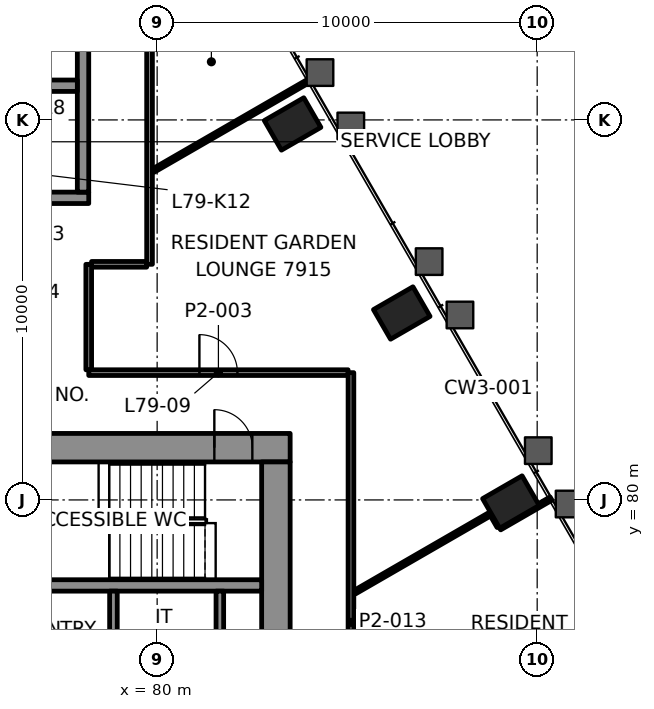
"""IFC4 building model, lengths in metres.
Left out: names, types, materials, properties, quantities, classifications, styles, units other than length and angle.
Written with IfcOpenShell. Run it as: python <this file> out.ifc"""

import sys

from ifc_helpers import new_model, si_unit, direction, frame, frame_2d, origin, origin_2d, place, context, subcontext, project, spatial, rectangle, hollow_rectangle, extrude, element, fill, save


model = new_model("IFC4")
c1 = context("Model", 3, precision=1e-05, world=origin(), true_north=direction((0.0, 1.0)))
c2 = subcontext(c1, "Body", "Model", "MODEL_VIEW")
j1 = project(units=[si_unit("LENGTHUNIT", "METRE"), si_unit("PLANEANGLEUNIT", "RADIAN")], contexts=[c1])
p1 = place(None, origin())
s1 = spatial("IfcSite", under=j1, at=p1, CompositionType="ELEMENT")
p2 = place(p1, origin())
s2 = spatial("IfcBuilding", under=s1, at=p2, CompositionType="ELEMENT")
p3 = place(p2, frame((0.0, 0.0, 323.1)))
s3 = spatial("IfcBuildingStorey", under=s2, at=p3, CompositionType="ELEMENT", Elevation=323.1)
for number, where, z_axis, x_axis in (
    (1, (89.309, 79.945, -0.0), (0.0, 0.0, 1.0), (-0.5, 0.866, 0.0)),
    (2, (86.437, 84.919, -0.0), (0.0, 0.0, 1.0), (-0.5, 0.866, 0.0)),
    (3, (83.565, 89.894, -0.0), (0.0, 0.0, 1.0), (-0.5, 0.866, 0.0)),
):
    element("IfcColumn", number, at=place(p3, frame(where, z_axis=z_axis, x_axis=x_axis)), inside=s3, PredefinedType="COLUMN", context=c2, shape_type="SweptSolid", body=[
        extrude(hollow_rectangle(XDim=0.9, YDim=1.2, WallThickness=0.06, at=origin_2d()), origin(), (0.0, 0.0, 1.0), 3.5),
    ])
p4 = place(p3, frame((66.5, 81.375, 0.0), z_axis=(0.0, 0.0, 1.0), x_axis=(1.0, 0.0, 0.0)))
e4 = element("IfcWall", 4, at=p4, inside=s3, PredefinedType="SHEAR", context=c2, shape_type="SweptSolid", body=[
    extrude(rectangle(XDim=17.0, YDim=0.75, at=frame_2d((8.5, 0.0))), origin(), (0.0, 0.0, 1.0), 3.2),
])
p5 = place(p4, frame((1.195, 0.0, 0.0)))
e5 = element("IfcOpeningElement", 5, at=p5, cuts=e4, PredefinedType="OPENING", context=c2, shape_type="SweptSolid", body=[
    extrude(rectangle(XDim=1.0, YDim=2.1, at=frame_2d((0.5, 1.05))), frame((0.0, 0.385, 0.0), z_axis=(0.0, -1.0, 0.0), x_axis=(1.0, 0.0, 0.0)), (0.0, 0.0, 1.0), 0.77),
])
p6 = place(p4, frame((15.005, 0.0, 0.0)))
e6 = element("IfcOpeningElement", 6, at=p6, cuts=e4, PredefinedType="OPENING", context=c2, shape_type="SweptSolid", body=[
    extrude(rectangle(XDim=1.0, YDim=2.1, at=frame_2d((0.5, 1.05))), frame((0.0, 0.385, 0.0), z_axis=(0.0, -1.0, 0.0), x_axis=(1.0, 0.0, 0.0)), (0.0, 0.0, 1.0), 0.77),
])
p7 = place(p4, frame((8.15, 0.0, 0.0)))
e7 = element("IfcOpeningElement", 7, at=p7, cuts=e4, PredefinedType="OPENING", context=c2, shape_type="SweptSolid", body=[
    extrude(rectangle(XDim=0.9, YDim=2.1, at=frame_2d((0.45, 1.05))), frame((0.0, 0.385, 0.0), z_axis=(0.0, -1.0, 0.0), x_axis=(1.0, 0.0, 0.0)), (0.0, 0.0, 1.0), 0.77),
])
p8 = place(p3, frame((83.125, 69.0, 0.0), z_axis=(0.0, 0.0, 1.0), x_axis=(0.0, 1.0, 0.0)))
e8 = element("IfcWall", 8, at=p8, inside=s3, PredefinedType="SHEAR", context=c2, shape_type="SweptSolid", body=[
    extrude(rectangle(XDim=12.0, YDim=0.75, at=frame_2d((6.0, 0.0))), origin(), (0.0, 0.0, 1.0), 3.2),
])
p9 = place(p8, frame((3.4, 0.0, 0.0)))
e9 = element("IfcOpeningElement", 9, at=p9, cuts=e8, PredefinedType="OPENING", context=c2, shape_type="SweptSolid", body=[
    extrude(rectangle(XDim=1.8, YDim=2.1, at=frame_2d((0.9, 1.05))), frame((0.0, 0.385, 0.0), z_axis=(0.0, -1.0, 0.0), x_axis=(1.0, 0.0, 0.0)), (0.0, 0.0, 1.0), 0.77),
])
p10 = place(p3, frame((67.25, 77.75, 0.0), z_axis=(0.0, 0.0, 1.0), x_axis=(1.0, 0.0, 0.0)))
e10 = element("IfcWall", 10, at=p10, inside=s3, PredefinedType="SHEAR", context=c2, shape_type="SweptSolid", body=[
    extrude(rectangle(XDim=15.5, YDim=0.3, at=frame_2d((7.75, 0.0))), origin(), (0.0, 0.0, 1.0), 3.2),
])
p11 = place(p10, frame((0.445, 0.0, 0.0)))
e11 = element("IfcOpeningElement", 11, at=p11, cuts=e10, PredefinedType="OPENING", context=c2, shape_type="SweptSolid", body=[
    extrude(rectangle(XDim=1.0, YDim=2.1, at=frame_2d((0.5, 1.05))), frame((0.0, 0.16, 0.0), z_axis=(0.0, -1.0, 0.0), x_axis=(1.0, 0.0, 0.0)), (0.0, 0.0, 1.0), 0.32),
])
p12 = place(p3, frame((71.8, 87.95, 0.0), z_axis=(0.0, 0.0, 1.0), x_axis=(1.0, 0.0, 0.0)))
e12 = element("IfcWall", 12, at=p12, inside=s3, PredefinedType="SHEAR", context=c2, shape_type="SweptSolid", body=[
    extrude(rectangle(XDim=6.4, YDim=0.3, at=frame_2d((3.2, 0.0))), origin(), (0.0, 0.0, 1.0), 3.2),
])
p13 = place(p12, frame((1.325, 0.0, 0.0)))
e13 = element("IfcOpeningElement", 13, at=p13, cuts=e12, PredefinedType="OPENING", context=c2, shape_type="SweptSolid", body=[
    extrude(rectangle(XDim=1.0, YDim=2.1, at=frame_2d((0.5, 1.05))), frame((0.0, 0.16, 0.0), z_axis=(0.0, -1.0, 0.0), x_axis=(1.0, 0.0, 0.0)), (0.0, 0.0, 1.0), 0.32),
])
p14 = place(p12, frame((4.125, 0.0, 0.0)))
e14 = element("IfcOpeningElement", 14, at=p14, cuts=e12, PredefinedType="OPENING", context=c2, shape_type="SweptSolid", body=[
    extrude(rectangle(XDim=1.2, YDim=2.1, at=frame_2d((0.6, 1.05))), frame((0.0, 0.16, 0.0), z_axis=(0.0, -1.0, 0.0), x_axis=(1.0, 0.0, 0.0)), (0.0, 0.0, 1.0), 0.32),
])
p15 = place(p3, frame((78.05, 88.1, 0.0), z_axis=(0.0, 0.0, 1.0), x_axis=(0.0, 1.0, 0.0)))
e15 = element("IfcWall", 15, at=p15, inside=s3, PredefinedType="SHEAR", context=c2, shape_type="SweptSolid", body=[
    extrude(rectangle(XDim=6.2, YDim=0.3, at=frame_2d((3.1, 0.0))), origin(), (0.0, 0.0, 1.0), 3.2),
])
p16 = place(p3, frame((75.3, 90.9, 0.0), z_axis=(0.0, 0.0, 1.0), x_axis=(1.0, 0.0, 0.0)))
e16 = element("IfcWall", 16, at=p16, inside=s3, PredefinedType="SHEAR", context=c2, shape_type="SweptSolid", body=[
    extrude(rectangle(XDim=2.6, YDim=0.3, at=frame_2d((1.3, 0.0))), origin(), (0.0, 0.0, 1.0), 3.2),
])
p17 = place(p16, frame((0.675, 0.0, 0.0)))
e17 = element("IfcOpeningElement", 17, at=p17, cuts=e16, PredefinedType="OPENING", context=c2, shape_type="SweptSolid", body=[
    extrude(rectangle(XDim=1.1, YDim=2.1, at=frame_2d((0.55, 1.05))), frame((0.0, 0.16, 0.0), z_axis=(0.0, -1.0, 0.0), x_axis=(1.0, 0.0, 0.0)), (0.0, 0.0, 1.0), 0.32),
])
p18 = place(p3, frame((78.2, 83.35, 0.0), z_axis=(0.0, 0.0, 1.0), x_axis=(1.0, 0.0, 0.0)))
e18 = element("IfcWall", 18, at=p18, inside=s3, PredefinedType="PARTITIONING", context=c2, shape_type="SweptSolid", body=[
    extrude(rectangle(XDim=6.824, YDim=0.15, at=frame_2d((3.412, 0.0))), origin(), (0.0, 0.0, 1.0), 2.6),
])
p19 = place(p18, frame((2.912, 0.0, 0.0)))
e19 = element("IfcOpeningElement", 19, at=p19, cuts=e18, PredefinedType="OPENING", context=c2, shape_type="SweptSolid", body=[
    extrude(rectangle(XDim=1.0, YDim=2.1, at=frame_2d((0.5, 1.05))), frame((0.0, 0.085, 0.0), z_axis=(0.0, -1.0, 0.0), x_axis=(1.0, 0.0, 0.0)), (0.0, 0.0, 1.0), 0.17),
])
p20 = place(p3, frame((78.275, 86.2, 0.0), z_axis=(0.0, 0.0, 1.0), x_axis=(1.0, 0.0, 0.0)))
e20 = element("IfcWall", 20, at=p20, inside=s3, PredefinedType="PARTITIONING", context=c2, shape_type="SweptSolid", body=[
    extrude(rectangle(XDim=1.449, YDim=0.15, at=frame_2d((0.725, 0.0))), origin(), (0.0, 0.0, 1.0), 2.6),
])
p21 = place(p3, frame((89.014, 79.255, 0.0), z_axis=(0.0, 0.0, 1.0), x_axis=(0.866018739521, 0.500011542666, 0.0)))
e21 = element("IfcWall", 21, at=p21, inside=s3, PredefinedType="PARTITIONING", context=c2, shape_type="SweptSolid", body=[
    extrude(rectangle(XDim=1.56, YDim=0.1, at=frame_2d((0.78, 0.0))), origin(), (0.0, 0.0, 1.0), 2.588),
])
p22 = place(p3, frame((85.201, 77.573, 0.0), z_axis=(0.0, 0.0, 1.0), x_axis=(0.866029543084, 0.499992830454, 0.0)))
e22 = element("IfcWall", 22, at=p22, inside=s3, PredefinedType="PARTITIONING", context=c2, shape_type="SweptSolid", body=[
    extrude(rectangle(XDim=4.143, YDim=0.1, at=frame_2d((2.071, 0.0))), origin(), (0.0, 0.0, 1.0), 2.6),
])
p23 = place(p3, frame((79.901, 88.668, 0.0), z_axis=(0.0, 0.0, 1.0), x_axis=(0.866040813102, 0.499973309328, 0.0)))
e23 = element("IfcWall", 23, at=p23, inside=s3, PredefinedType="PARTITIONING", context=c2, shape_type="SweptSolid", body=[
    extrude(rectangle(XDim=4.746, YDim=0.1, at=frame_2d((2.373, 0.0))), origin(), (0.0, 0.0, 1.0), 2.6),
])
p24 = place(p3, frame((85.1, 83.349, 0.0), z_axis=(0.0, 0.0, 1.0), x_axis=(0.0, -1.0, 0.0)))
e24 = element("IfcWall", 24, at=p24, inside=s3, PredefinedType="PARTITIONING", context=c2, shape_type="SweptSolid", body=[
    extrude(rectangle(XDim=13.141, YDim=0.15, at=frame_2d((6.571, 0.0))), origin(), (0.0, 0.0, 1.0), 2.6),
])
p25 = place(p24, frame((8.886, 0.0, 0.0)))
e25 = element("IfcOpeningElement", 25, at=p25, cuts=e24, PredefinedType="OPENING", context=c2, shape_type="SweptSolid", body=[
    extrude(rectangle(XDim=1.0, YDim=2.1, at=frame_2d((0.5, 1.05))), frame((0.0, 0.085, 0.0), z_axis=(0.0, -1.0, 0.0), x_axis=(1.0, 0.0, 0.0)), (0.0, 0.0, 1.0), 0.17),
])
p26 = place(p3, frame((79.8, 86.2, 0.0), z_axis=(0.0, 0.0, 1.0), x_axis=(0.0, 1.0, 0.0)))
e26 = element("IfcWall", 26, at=p26, inside=s3, PredefinedType="PARTITIONING", context=c2, shape_type="SweptSolid", body=[
    extrude(rectangle(XDim=9.999, YDim=0.15, at=frame_2d((5.0, 0.0))), origin(), (0.0, 0.0, 1.0), 2.6),
])
p27 = place(p3, frame((78.2, 83.425, 0.0), z_axis=(0.0, 0.0, 1.0), x_axis=(0.0, 1.0, 0.0)))
e27 = element("IfcWall", 27, at=p27, inside=s3, PredefinedType="PARTITIONING", context=c2, shape_type="SweptSolid", body=[
    extrude(rectangle(XDim=2.775, YDim=0.15, at=frame_2d((1.387, 0.0))), origin(), (0.0, 0.0, 1.0), 2.6),
])
p28 = place(p3, frame((88.989, 79.299, 0.0), z_axis=(0.0, 0.0, 1.0), x_axis=(-0.500126092966, 0.865952591736, 0.0)))
e28 = element("IfcWall", 28, at=p28, inside=s3, PredefinedType="PARTITIONING", context=c2, shape_type="SweptSolid", body=[
    extrude(rectangle(XDim=0.349, YDim=0.1, at=frame_2d((0.175, 0.0))), origin(), (0.0, 0.0, 1.0), 2.6),
])
for number, where, z_axis, x_axis in (
    (29, (78.85, 74.95, 0.0), (0.0, 0.0, 1.0), (0.0, 1.0, 0.0)),
    (30, (81.65, 74.95, 0.0), (0.0, 0.0, 1.0), (0.0, 1.0, 0.0)),
):
    element("IfcWall", number, at=place(p3, frame(where, z_axis=z_axis, x_axis=x_axis)), inside=s3, PredefinedType="PARTITIONING", context=c2, shape_type="SweptSolid", body=[
        extrude(rectangle(XDim=2.65, YDim=0.2, at=frame_2d((1.325, 0.0))), origin(), (0.0, 0.0, 1.0), 3.2),
    ])
p29 = place(p19, origin())
e31 = element("IfcDoor", 31, at=p29, inside=s3, OperationType="SINGLE_SWING_RIGHT", PredefinedType="DOOR", context=c2, shape_type="SweptSolid", body=[
    extrude(rectangle(XDim=1.0, YDim=2.1, at=frame_2d((0.5, 1.05))), frame((0.0, 0.025, 0.0), z_axis=(0.0, -1.0, 0.0), x_axis=(1.0, 0.0, 0.0)), (0.0, 0.0, 1.0), 0.05),
])
fill(e19, e31)
p30 = place(p6, origin())
e32 = element("IfcDoor", 32, at=p30, inside=s3, OperationType="SINGLE_SWING_LEFT", PredefinedType="DOOR", context=c2, shape_type="SweptSolid", body=[
    extrude(rectangle(XDim=1.0, YDim=2.1, at=frame_2d((0.5, 1.05))), frame((0.0, 0.095, 0.0), z_axis=(0.0, -1.0, 0.0), x_axis=(1.0, 0.0, 0.0)), (0.0, 0.0, 1.0), 0.19),
])
fill(e6, e32)
save(model, sys.argv[1])
